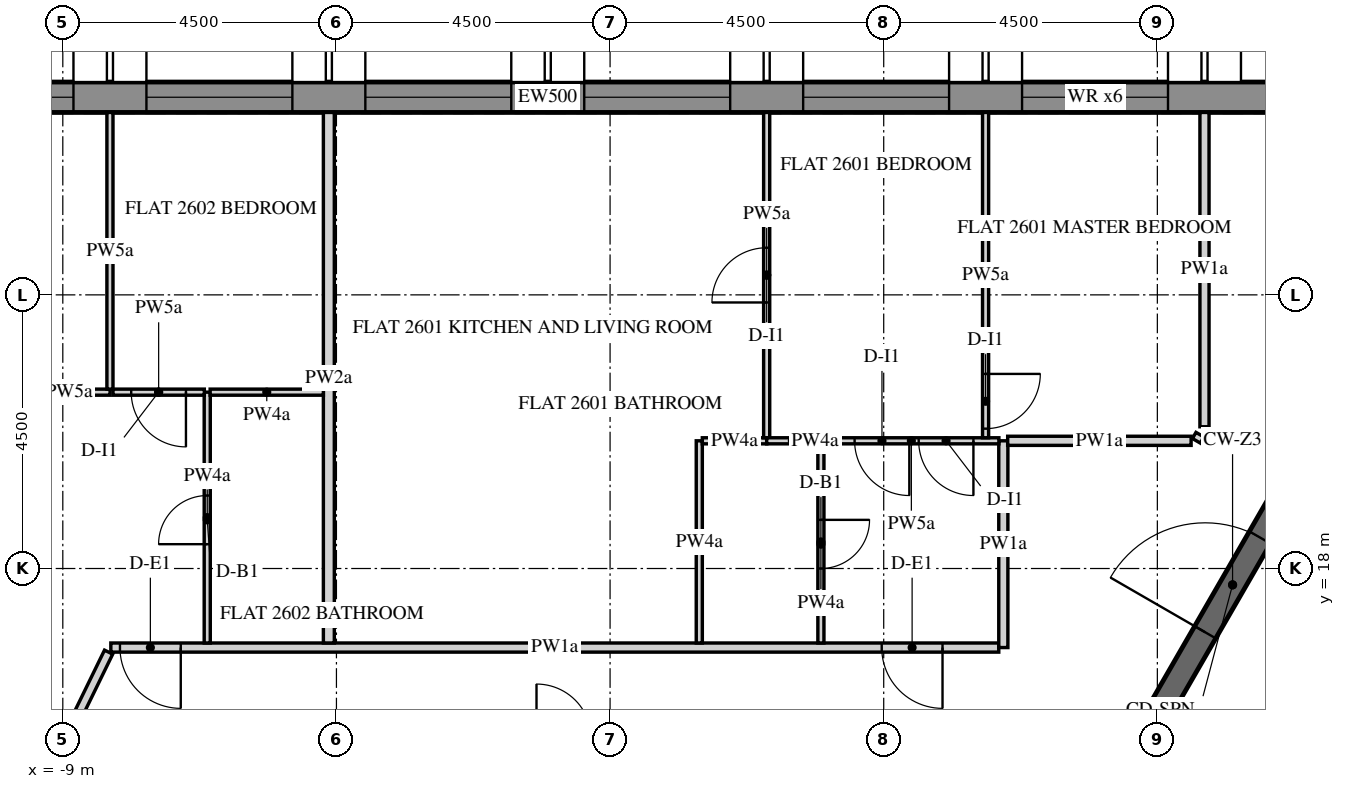
"""IFC4 building model, lengths in metres.
Left out: names, types, materials, properties, quantities, classifications, styles, units other than length and angle.
Written with IfcOpenShell. Run it as: python <this file> out.ifc"""

import sys

from ifc_helpers import new_model, si_unit, direction, frame, frame_2d, origin, place, context, subcontext, project, spatial, polyline, rectangle, outline, extrude, element, fill, save


model = new_model("IFC4")
c1 = context("Model", 3, precision=1e-05, world=origin(), true_north=direction((0.0, 1.0)))
c2 = subcontext(c1, "Body", "Model", "MODEL_VIEW")
j1 = project(units=[si_unit("LENGTHUNIT", "METRE"), si_unit("PLANEANGLEUNIT", "RADIAN")], contexts=[c1])
p1 = place(None, origin())
s1 = spatial("IfcSite", under=j1, at=p1, CompositionType="ELEMENT")
p2 = place(p1, origin())
s2 = spatial("IfcBuilding", under=s1, at=p2, CompositionType="ELEMENT")
p3 = place(p2, frame((0.0, 0.0, 326.4)))
s3 = spatial("IfcBuildingStorey", under=s2, at=p3, CompositionType="ELEMENT", Elevation=326.4)
p4 = place(p3, frame((11.698, 25.75, -0.15), z_axis=(0.0, 0.0, 1.0), x_axis=(-1.0, 0.0, 0.0)))
e1 = element("IfcWall", 1, at=p4, inside=s3, PredefinedType="SOLIDWALL", context=c2, shape_type="SweptSolid", body=[
    extrude(outline(polyline([(-0.021, -0.25), (25.468, -0.25), (25.421, 0.25), (0.021, 0.25), (-0.021, -0.25)])), origin(), (0.0, 0.0, 1.0), 3.9),
])
p5 = place(p4, frame((2.522, 0.0, 0.75)))
e2 = element("IfcOpeningElement", 2, at=p5, cuts=e1, PredefinedType="OPENING", context=c2, shape_type="SweptSolid", body=[
    extrude(rectangle(XDim=2.4, YDim=2.7, at=frame_2d((1.2, 1.35))), frame((0.0, 0.26, 0.0), z_axis=(0.0, -1.0, 0.0), x_axis=(1.0, 0.0, 0.0)), (0.0, 0.0, 1.0), 0.52),
])
p6 = place(p4, frame((6.122, 0.0, 0.75)))
e3 = element("IfcOpeningElement", 3, at=p6, cuts=e1, PredefinedType="OPENING", context=c2, shape_type="SweptSolid", body=[
    extrude(rectangle(XDim=2.4, YDim=2.7, at=frame_2d((1.2, 1.35))), frame((0.0, 0.26, 0.0), z_axis=(0.0, -1.0, 0.0), x_axis=(1.0, 0.0, 0.0)), (0.0, 0.0, 1.0), 0.52),
])
p7 = place(p4, frame((9.722, 0.0, 0.75)))
e4 = element("IfcOpeningElement", 4, at=p7, cuts=e1, PredefinedType="OPENING", context=c2, shape_type="SweptSolid", body=[
    extrude(rectangle(XDim=2.4, YDim=2.7, at=frame_2d((1.2, 1.35))), frame((0.0, 0.26, 0.0), z_axis=(0.0, -1.0, 0.0), x_axis=(1.0, 0.0, 0.0)), (0.0, 0.0, 1.0), 0.52),
])
p8 = place(p4, frame((13.323, 0.0, 0.75)))
e5 = element("IfcOpeningElement", 5, at=p8, cuts=e1, PredefinedType="OPENING", context=c2, shape_type="SweptSolid", body=[
    extrude(rectangle(XDim=2.4, YDim=2.7, at=frame_2d((1.2, 1.35))), frame((0.0, 0.26, 0.0), z_axis=(0.0, -1.0, 0.0), x_axis=(1.0, 0.0, 0.0)), (0.0, 0.0, 1.0), 0.52),
])
p9 = place(p4, frame((16.922, 0.0, 0.75)))
e6 = element("IfcOpeningElement", 6, at=p9, cuts=e1, PredefinedType="OPENING", context=c2, shape_type="SweptSolid", body=[
    extrude(rectangle(XDim=2.4, YDim=2.7, at=frame_2d((1.2, 1.35))), frame((0.0, 0.26, 0.0), z_axis=(0.0, -1.0, 0.0), x_axis=(1.0, 0.0, 0.0)), (0.0, 0.0, 1.0), 0.52),
])
p10 = place(p4, frame((20.522, 0.0, 0.75)))
e7 = element("IfcOpeningElement", 7, at=p10, cuts=e1, PredefinedType="OPENING", context=c2, shape_type="SweptSolid", body=[
    extrude(rectangle(XDim=2.4, YDim=2.7, at=frame_2d((1.2, 1.35))), frame((0.0, 0.26, 0.0), z_axis=(0.0, -1.0, 0.0), x_axis=(1.0, 0.0, 0.0)), (0.0, 0.0, 1.0), 0.52),
])
p11 = place(p3, frame((6.351, 11.0, -0.15), z_axis=(0.0, 0.0, 1.0), x_axis=(0.499998894578, 0.866026041999, 0.0)))
e8 = element("IfcWall", 8, at=p11, inside=s3, PredefinedType="SHEAR", context=c2, shape_type="SweptSolid", body=[
    extrude(rectangle(XDim=15.544, YDim=0.4, at=frame_2d((7.772, 0.0))), origin(), (0.0, 0.0, 1.0), 3.9),
])
p12 = place(p11, frame((6.872, 0.0, 0.15)))
e9 = element("IfcOpeningElement", 9, at=p12, cuts=e8, PredefinedType="OPENING", context=c2, shape_type="SweptSolid", body=[
    extrude(rectangle(XDim=1.8, YDim=2.4, at=frame_2d((0.9, 1.2))), frame((0.0, 0.21, 0.0), z_axis=(0.0, -1.0, 0.0), x_axis=(1.0, 0.0, 0.0)), (0.0, 0.0, 1.0), 0.42),
])
p13 = place(p3, frame((6.392, 16.7, 0.0), z_axis=(0.0, 0.0, 1.0), x_axis=(-1.0, 0.0, 0.0)))
e10 = element("IfcWall", 10, at=p13, inside=s3, PredefinedType="PARTITIONING", context=c2, shape_type="SweptSolid", body=[
    extrude(rectangle(XDim=14.602, YDim=0.15, at=frame_2d((7.301, 0.0))), origin(), (0.0, 0.0, 1.0), 2.838),
])
p14 = place(p13, frame((0.925, 0.0, 0.0)))
e11 = element("IfcOpeningElement", 11, at=p14, cuts=e10, PredefinedType="OPENING", context=c2, shape_type="SweptSolid", body=[
    extrude(rectangle(XDim=1.0, YDim=2.1, at=frame_2d((0.5, 1.05))), frame((0.0, 0.085, 0.0), z_axis=(0.0, -1.0, 0.0), x_axis=(1.0, 0.0, 0.0)), (0.0, 0.0, 1.0), 0.17),
])
p15 = place(p13, frame((13.452, 0.0, 0.0)))
e12 = element("IfcOpeningElement", 12, at=p15, cuts=e10, PredefinedType="OPENING", context=c2, shape_type="SweptSolid", body=[
    extrude(rectangle(XDim=1.0, YDim=2.1, at=frame_2d((0.5, 1.05))), frame((0.0, 0.085, 0.0), z_axis=(0.0, -1.0, 0.0), x_axis=(1.0, 0.0, 0.0)), (0.0, 0.0, 1.0), 0.17),
])
p16 = place(p3, frame((6.467, 20.1, 0.0), z_axis=(0.0, 0.0, 1.0), x_axis=(0.0, -1.0, 0.0)))
e13 = element("IfcWall", 13, at=p16, inside=s3, PredefinedType="PARTITIONING", context=c2, shape_type="SweptSolid", body=[
    extrude(rectangle(XDim=3.4, YDim=0.15, at=frame_2d((1.7, 0.0))), origin(), (0.0, 0.0, 1.0), 2.838),
])
p17 = place(p3, frame((9.775, 25.5, 0.0), z_axis=(0.0, 0.0, 1.0), x_axis=(0.0, -1.0, 0.0)))
e14 = element("IfcWall", 14, at=p17, inside=s3, PredefinedType="PARTITIONING", context=c2, shape_type="SweptSolid", body=[
    extrude(rectangle(XDim=5.169, YDim=0.15, at=frame_2d((2.584, 0.0))), origin(), (0.0, 0.0, 1.0), 2.838),
])
p18 = place(p3, frame((9.7, 20.201, 0.0), z_axis=(0.0, 0.0, 1.0), x_axis=(-0.49996389635, -0.866046247233, 0.0)))
e15 = element("IfcWall", 15, at=p18, inside=s3, PredefinedType="PARTITIONING", context=c2, shape_type="SweptSolid", body=[
    extrude(rectangle(XDim=0.117, YDim=0.15, at=frame_2d((0.058, 0.0))), origin(), (0.0, 0.0, 1.0), 2.838),
])
p19 = place(p3, frame((9.555, 20.1, 0.0), z_axis=(0.0, 0.0, 1.0), x_axis=(-1.0, 0.0, 0.0)))
e16 = element("IfcWall", 16, at=p19, inside=s3, PredefinedType="PARTITIONING", context=c2, shape_type="SweptSolid", body=[
    extrude(rectangle(XDim=3.017, YDim=0.15, at=frame_2d((1.508, 0.0))), origin(), (0.0, 0.0, 1.0), 2.838),
])
p20 = place(p3, frame((-8.247, 16.625, 0.0), z_axis=(0.0, 0.0, 1.0), x_axis=(-0.438376416131, -0.89879147625, 0.0)))
e17 = element("IfcWall", 17, at=p20, inside=s3, PredefinedType="PARTITIONING", context=c2, shape_type="SweptSolid", body=[
    extrude(rectangle(XDim=16.606, YDim=0.15, at=frame_2d((8.303, 0.0))), origin(), (0.0, 0.0, 1.0), 2.838),
])
p21 = place(p20, frame((6.103, 0.0, 0.0)))
e18 = element("IfcOpeningElement", 18, at=p21, cuts=e17, PredefinedType="OPENING", context=c2, shape_type="SweptSolid", body=[
    extrude(rectangle(XDim=1.0, YDim=2.1, at=frame_2d((0.5, 1.05))), frame((0.0, 0.085, 0.0), z_axis=(0.0, -1.0, 0.0), x_axis=(1.0, 0.0, 0.0)), (0.0, 0.0, 1.0), 0.17),
])
p22 = place(p3, frame((9.277, 12.668, 0.0), z_axis=(0.0, 0.0, 1.0), x_axis=(0.499991012162, 0.866030592853, 0.0)))
e19 = element("IfcWall", 19, at=p22, inside=s3, PredefinedType="PARTITIONING", context=c2, shape_type="SweptSolid", body=[
    extrude(rectangle(XDim=7.764, YDim=0.15, at=frame_2d((3.882, 0.0))), origin(), (0.0, 0.0, 1.0), 2.838),
])
p23 = place(p3, frame((1.467, 16.775, 0.0), z_axis=(0.0, 0.0, 1.0), x_axis=(0.0, 1.0, 0.0)))
e20 = element("IfcWall", 20, at=p23, inside=s3, PredefinedType="PARTITIONING", context=c2, shape_type="SweptSolid", body=[
    extrude(rectangle(XDim=3.325, YDim=0.1, at=frame_2d((1.663, 0.0))), origin(), (0.0, 0.0, 1.0), 2.838),
])
p24 = place(p3, frame((1.517, 20.1, 0.0), z_axis=(0.0, 0.0, 1.0), x_axis=(1.0, 0.0, 0.0)))
e21 = element("IfcWall", 21, at=p24, inside=s3, PredefinedType="PARTITIONING", context=c2, shape_type="SweptSolid", body=[
    extrude(rectangle(XDim=1.06, YDim=0.1, at=frame_2d((0.53, 0.0))), origin(), (0.0, 0.0, 1.0), 2.838),
])
p25 = place(p3, frame((2.575, 20.15, 0.0), z_axis=(0.0, 0.0, 1.0), x_axis=(0.0, 1.0, 0.0)))
e22 = element("IfcWall", 22, at=p25, inside=s3, PredefinedType="PARTITIONING", context=c2, shape_type="SweptSolid", body=[
    extrude(rectangle(XDim=5.35, YDim=0.1, at=frame_2d((2.675, 0.0))), origin(), (0.0, 0.0, 1.0), 2.838),
])
p26 = place(p25, frame((2.225, 0.0, 0.0)))
e23 = element("IfcOpeningElement", 23, at=p26, cuts=e22, PredefinedType="OPENING", context=c2, shape_type="SweptSolid", body=[
    extrude(rectangle(XDim=0.9, YDim=2.1, at=frame_2d((0.45, 1.05))), frame((0.0, 0.06, 0.0), z_axis=(0.0, -1.0, 0.0), x_axis=(1.0, 0.0, 0.0)), (0.0, 0.0, 1.0), 0.12),
])
p27 = place(p3, frame((-4.625, 25.5, 0.0), z_axis=(0.0, 0.0, 1.0), x_axis=(0.0, -1.0, 0.0)))
e24 = element("IfcWall", 24, at=p27, inside=s3, PredefinedType="PARTITIONING", context=c2, shape_type="SweptSolid", body=[
    extrude(rectangle(XDim=8.725, YDim=0.18, at=frame_2d((4.363, 0.0))), origin(), (0.0, 0.0, 1.0), 2.838),
])
p28 = place(p3, frame((3.467, 20.1, 0.0), z_axis=(0.0, 0.0, 1.0), x_axis=(0.0, -1.0, 0.0)))
e25 = element("IfcWall", 25, at=p28, inside=s3, PredefinedType="PARTITIONING", context=c2, shape_type="SweptSolid", body=[
    extrude(rectangle(XDim=3.325, YDim=0.1, at=frame_2d((1.663, 0.0))), origin(), (0.0, 0.0, 1.0), 2.838),
])
p29 = place(p28, frame((1.3, 0.0, 0.0)))
e26 = element("IfcOpeningElement", 26, at=p29, cuts=e25, PredefinedType="OPENING", context=c2, shape_type="SweptSolid", body=[
    extrude(rectangle(XDim=0.8, YDim=2.1, at=frame_2d((0.4, 1.05))), frame((0.0, 0.06, 0.0), z_axis=(0.0, -1.0, 0.0), x_axis=(1.0, 0.0, 0.0)), (0.0, 0.0, 1.0), 0.12),
])
p30 = place(p3, frame((6.394, 20.1, 0.0), z_axis=(0.0, 0.0, 1.0), x_axis=(-1.0, 0.0, 0.0)))
e27 = element("IfcWall", 27, at=p30, inside=s3, PredefinedType="PARTITIONING", context=c2, shape_type="SweptSolid", body=[
    extrude(rectangle(XDim=2.879, YDim=0.1, at=frame_2d((1.439, 0.0))), origin(), (0.0, 0.0, 1.0), 2.838),
])
p31 = place(p30, frame((0.419, 0.0, 0.0)))
e28 = element("IfcOpeningElement", 28, at=p31, cuts=e27, PredefinedType="OPENING", context=c2, shape_type="SweptSolid", body=[
    extrude(rectangle(XDim=0.9, YDim=2.1, at=frame_2d((0.45, 1.05))), frame((0.0, 0.06, 0.0), z_axis=(0.0, -1.0, 0.0), x_axis=(1.0, 0.0, 0.0)), (0.0, 0.0, 1.0), 0.12),
])
p32 = place(p30, frame((1.473, 0.0, 0.0)))
e29 = element("IfcOpeningElement", 29, at=p32, cuts=e27, PredefinedType="OPENING", context=c2, shape_type="SweptSolid", body=[
    extrude(rectangle(XDim=0.9, YDim=2.1, at=frame_2d((0.45, 1.05))), frame((0.0, 0.06, 0.0), z_axis=(0.0, -1.0, 0.0), x_axis=(1.0, 0.0, 0.0)), (0.0, 0.0, 1.0), 0.12),
])
p33 = place(p3, frame((3.419, 20.1, 0.0), z_axis=(0.0, 0.0, 1.0), x_axis=(-1.0, 0.0, 0.0)))
e30 = element("IfcWall", 30, at=p33, inside=s3, PredefinedType="PARTITIONING", context=c2, shape_type="SweptSolid", body=[
    extrude(rectangle(XDim=0.844, YDim=0.1, at=frame_2d((0.422, 0.0))), origin(), (0.0, 0.0, 1.0), 2.838),
])
p34 = place(p3, frame((6.175, 25.5, 0.0), z_axis=(0.0, 0.0, 1.0), x_axis=(0.0, -1.0, 0.0)))
e31 = element("IfcWall", 31, at=p34, inside=s3, PredefinedType="PARTITIONING", context=c2, shape_type="SweptSolid", body=[
    extrude(rectangle(XDim=5.35, YDim=0.1, at=frame_2d((2.675, 0.0))), origin(), (0.0, 0.0, 1.0), 2.838),
])
p35 = place(p34, frame((4.3, 0.0, 0.0)))
e32 = element("IfcOpeningElement", 32, at=p35, cuts=e31, PredefinedType="OPENING", context=c2, shape_type="SweptSolid", body=[
    extrude(rectangle(XDim=0.9, YDim=2.1, at=frame_2d((0.45, 1.05))), frame((0.0, 0.06, 0.0), z_axis=(0.0, -1.0, 0.0), x_axis=(1.0, 0.0, 0.0)), (0.0, 0.0, 1.0), 0.12),
])
p36 = place(p3, frame((-9.575, 20.9, 0.0), z_axis=(0.0, 0.0, 1.0), x_axis=(1.0, 0.0, 0.0)))
e33 = element("IfcWall", 33, at=p36, inside=s3, PredefinedType="PARTITIONING", context=c2, shape_type="SweptSolid", body=[
    extrude(rectangle(XDim=1.352, YDim=0.1, at=frame_2d((0.676, 0.0))), origin(), (0.0, 0.0, 1.0), 2.838),
])
p37 = place(p3, frame((-8.225, 20.95, 0.0), z_axis=(0.0, 0.0, 1.0), x_axis=(0.0, 1.0, 0.0)))
e34 = element("IfcWall", 34, at=p37, inside=s3, PredefinedType="PARTITIONING", context=c2, shape_type="SweptSolid", body=[
    extrude(rectangle(XDim=4.55, YDim=0.1, at=frame_2d((2.275, 0.0))), origin(), (0.0, 0.0, 1.0), 2.838),
])
p38 = place(p3, frame((-6.625, 16.775, 0.0), z_axis=(0.0, 0.0, 1.0), x_axis=(0.0, 1.0, 0.0)))
e35 = element("IfcWall", 35, at=p38, inside=s3, PredefinedType="PARTITIONING", context=c2, shape_type="SweptSolid", body=[
    extrude(rectangle(XDim=4.125, YDim=0.1, at=frame_2d((2.062, 0.0))), origin(), (0.0, 0.0, 1.0), 2.838),
])
p39 = place(p38, frame((1.625, 0.0, 0.0)))
e36 = element("IfcOpeningElement", 36, at=p39, cuts=e35, PredefinedType="OPENING", context=c2, shape_type="SweptSolid", body=[
    extrude(rectangle(XDim=0.8, YDim=2.1, at=frame_2d((0.4, 1.05))), frame((0.0, 0.06, 0.0), z_axis=(0.0, -1.0, 0.0), x_axis=(1.0, 0.0, 0.0)), (0.0, 0.0, 1.0), 0.12),
])
p40 = place(p3, frame((-6.673, 20.9, 0.0), z_axis=(0.0, 0.0, 1.0), x_axis=(-1.0, 0.0, 0.0)))
e37 = element("IfcWall", 37, at=p40, inside=s3, PredefinedType="PARTITIONING", context=c2, shape_type="SweptSolid", body=[
    extrude(rectangle(XDim=1.502, YDim=0.1, at=frame_2d((0.751, 0.0))), origin(), (0.0, 0.0, 1.0), 2.838),
])
p41 = place(p40, frame((0.302, 0.0, 0.0)))
e38 = element("IfcOpeningElement", 38, at=p41, cuts=e37, PredefinedType="OPENING", context=c2, shape_type="SweptSolid", body=[
    extrude(rectangle(XDim=0.9, YDim=2.1, at=frame_2d((0.45, 1.05))), frame((0.0, 0.06, 0.0), z_axis=(0.0, -1.0, 0.0), x_axis=(1.0, 0.0, 0.0)), (0.0, 0.0, 1.0), 0.12),
])
p42 = place(p3, frame((-4.715, 20.9, 0.0), z_axis=(0.0, 0.0, 1.0), x_axis=(-1.0, 0.0, 0.0)))
e39 = element("IfcWall", 39, at=p42, inside=s3, PredefinedType="PARTITIONING", context=c2, shape_type="SweptSolid", body=[
    extrude(rectangle(XDim=1.862, YDim=0.1, at=frame_2d((0.931, 0.0))), origin(), (0.0, 0.0, 1.0), 2.838),
])
p43 = place(p5, frame((0.0, 0.18, 0.0)))
e40 = element("IfcWindow", 40, at=p43, inside=s3, PartitioningType="DOUBLE_PANEL_VERTICAL", PredefinedType="WINDOW", context=c2, shape_type="SweptSolid", body=[
    extrude(rectangle(XDim=2.4, YDim=2.7, at=frame_2d((1.2, 1.35))), frame((0.0, 0.03, 0.0), z_axis=(0.0, -1.0, 0.0), x_axis=(1.0, 0.0, 0.0)), (0.0, 0.0, 1.0), 0.06),
])
fill(e2, e40)
p44 = place(p6, frame((0.0, 0.18, 0.0)))
e41 = element("IfcWindow", 41, at=p44, inside=s3, PartitioningType="DOUBLE_PANEL_VERTICAL", PredefinedType="WINDOW", context=c2, shape_type="SweptSolid", body=[
    extrude(rectangle(XDim=2.4, YDim=2.7, at=frame_2d((1.2, 1.35))), frame((0.0, 0.03, 0.0), z_axis=(0.0, -1.0, 0.0), x_axis=(1.0, 0.0, 0.0)), (0.0, 0.0, 1.0), 0.06),
])
fill(e3, e41)
p45 = place(p7, frame((0.0, 0.18, 0.0)))
e42 = element("IfcWindow", 42, at=p45, inside=s3, PartitioningType="DOUBLE_PANEL_VERTICAL", PredefinedType="WINDOW", context=c2, shape_type="SweptSolid", body=[
    extrude(rectangle(XDim=2.4, YDim=2.7, at=frame_2d((1.2, 1.35))), frame((0.0, 0.03, 0.0), z_axis=(0.0, -1.0, 0.0), x_axis=(1.0, 0.0, 0.0)), (0.0, 0.0, 1.0), 0.06),
])
fill(e4, e42)
p46 = place(p8, frame((0.0, 0.18, 0.0)))
e43 = element("IfcWindow", 43, at=p46, inside=s3, PartitioningType="DOUBLE_PANEL_VERTICAL", PredefinedType="WINDOW", context=c2, shape_type="SweptSolid", body=[
    extrude(rectangle(XDim=2.4, YDim=2.7, at=frame_2d((1.2, 1.35))), frame((0.0, 0.03, 0.0), z_axis=(0.0, -1.0, 0.0), x_axis=(1.0, 0.0, 0.0)), (0.0, 0.0, 1.0), 0.06),
])
fill(e5, e43)
p47 = place(p9, frame((0.0, 0.18, 0.0)))
e44 = element("IfcWindow", 44, at=p47, inside=s3, PartitioningType="DOUBLE_PANEL_VERTICAL", PredefinedType="WINDOW", context=c2, shape_type="SweptSolid", body=[
    extrude(rectangle(XDim=2.4, YDim=2.7, at=frame_2d((1.2, 1.35))), frame((0.0, 0.03, 0.0), z_axis=(0.0, -1.0, 0.0), x_axis=(1.0, 0.0, 0.0)), (0.0, 0.0, 1.0), 0.06),
])
fill(e6, e44)
p48 = place(p10, frame((0.0, 0.18, 0.0)))
e45 = element("IfcWindow", 45, at=p48, inside=s3, PartitioningType="DOUBLE_PANEL_VERTICAL", PredefinedType="WINDOW", context=c2, shape_type="SweptSolid", body=[
    extrude(rectangle(XDim=2.4, YDim=2.7, at=frame_2d((1.2, 1.35))), frame((0.0, 0.03, 0.0), z_axis=(0.0, -1.0, 0.0), x_axis=(1.0, 0.0, 0.0)), (0.0, 0.0, 1.0), 0.06),
])
fill(e7, e45)
p49 = place(p12, origin())
e46 = element("IfcDoor", 46, at=p49, inside=s3, OperationType="DOUBLE_DOOR_SINGLE_SWING", PredefinedType="DOOR", context=c2, shape_type="SweptSolid", body=[
    extrude(rectangle(XDim=1.8, YDim=2.4, at=frame_2d((0.9, 1.2))), frame((0.0, 0.025, 0.0), z_axis=(0.0, -1.0, 0.0), x_axis=(1.0, 0.0, 0.0)), (0.0, 0.0, 1.0), 0.05),
])
fill(e9, e46)
p50 = place(p14, origin())
e47 = element("IfcDoor", 47, at=p50, inside=s3, OperationType="SINGLE_SWING_RIGHT", PredefinedType="DOOR", context=c2, shape_type="SweptSolid", body=[
    extrude(rectangle(XDim=1.0, YDim=2.1, at=frame_2d((0.5, 1.05))), frame((0.0, 0.025, 0.0), z_axis=(0.0, -1.0, 0.0), x_axis=(1.0, 0.0, 0.0)), (0.0, 0.0, 1.0), 0.05),
])
fill(e11, e47)
p51 = place(p29, origin())
e48 = element("IfcDoor", 48, at=p51, inside=s3, OperationType="SINGLE_SWING_LEFT", PredefinedType="DOOR", context=c2, shape_type="SweptSolid", body=[
    extrude(rectangle(XDim=0.8, YDim=2.1, at=frame_2d((0.4, 1.05))), frame((0.0, 0.025, 0.0), z_axis=(0.0, -1.0, 0.0), x_axis=(1.0, 0.0, 0.0)), (0.0, 0.0, 1.0), 0.05),
])
fill(e26, e48)
p52 = place(p31, origin())
e49 = element("IfcDoor", 49, at=p52, inside=s3, OperationType="SINGLE_SWING_LEFT", PredefinedType="DOOR", context=c2, shape_type="SweptSolid", body=[
    extrude(rectangle(XDim=0.9, YDim=2.1, at=frame_2d((0.45, 1.05))), frame((0.0, 0.025, 0.0), z_axis=(0.0, -1.0, 0.0), x_axis=(1.0, 0.0, 0.0)), (0.0, 0.0, 1.0), 0.05),
])
fill(e28, e49)
p53 = place(p35, origin())
e50 = element("IfcDoor", 50, at=p53, inside=s3, OperationType="SINGLE_SWING_RIGHT", PredefinedType="DOOR", context=c2, shape_type="SweptSolid", body=[
    extrude(rectangle(XDim=0.9, YDim=2.1, at=frame_2d((0.45, 1.05))), frame((0.0, 0.025, 0.0), z_axis=(0.0, -1.0, 0.0), x_axis=(1.0, 0.0, 0.0)), (0.0, 0.0, 1.0), 0.05),
])
fill(e32, e50)
p54 = place(p32, origin())
e51 = element("IfcDoor", 51, at=p54, inside=s3, OperationType="SINGLE_SWING_LEFT", PredefinedType="DOOR", context=c2, shape_type="SweptSolid", body=[
    extrude(rectangle(XDim=0.9, YDim=2.1, at=frame_2d((0.45, 1.05))), frame((0.0, 0.025, 0.0), z_axis=(0.0, -1.0, 0.0), x_axis=(1.0, 0.0, 0.0)), (0.0, 0.0, 1.0), 0.05),
])
fill(e29, e51)
p55 = place(p15, origin())
e52 = element("IfcDoor", 52, at=p55, inside=s3, OperationType="SINGLE_SWING_LEFT", PredefinedType="DOOR", context=c2, shape_type="SweptSolid", body=[
    extrude(rectangle(XDim=1.0, YDim=2.1, at=frame_2d((0.5, 1.05))), frame((0.0, 0.025, 0.0), z_axis=(0.0, -1.0, 0.0), x_axis=(1.0, 0.0, 0.0)), (0.0, 0.0, 1.0), 0.05),
])
fill(e12, e52)
p56 = place(p39, origin())
e53 = element("IfcDoor", 53, at=p56, inside=s3, OperationType="SINGLE_SWING_RIGHT", PredefinedType="DOOR", context=c2, shape_type="SweptSolid", body=[
    extrude(rectangle(XDim=0.8, YDim=2.1, at=frame_2d((0.4, 1.05))), frame((0.0, 0.025, 0.0), z_axis=(0.0, -1.0, 0.0), x_axis=(1.0, 0.0, 0.0)), (0.0, 0.0, 1.0), 0.05),
])
fill(e36, e53)
p57 = place(p41, origin())
e54 = element("IfcDoor", 54, at=p57, inside=s3, OperationType="SINGLE_SWING_RIGHT", PredefinedType="DOOR", context=c2, shape_type="SweptSolid", body=[
    extrude(rectangle(XDim=0.9, YDim=2.1, at=frame_2d((0.45, 1.05))), frame((0.0, 0.025, 0.0), z_axis=(0.0, -1.0, 0.0), x_axis=(1.0, 0.0, 0.0)), (0.0, 0.0, 1.0), 0.05),
])
fill(e38, e54)
p58 = place(p26, origin())
e55 = element("IfcDoor", 55, at=p58, inside=s3, OperationType="SINGLE_SWING_LEFT", PredefinedType="DOOR", context=c2, shape_type="SweptSolid", body=[
    extrude(rectangle(XDim=0.9, YDim=2.1, at=frame_2d((0.45, 1.05))), frame((0.0, 0.025, 0.0), z_axis=(0.0, -1.0, 0.0), x_axis=(1.0, 0.0, 0.0)), (0.0, 0.0, 1.0), 0.05),
])
fill(e23, e55)
save(model, sys.argv[1])
